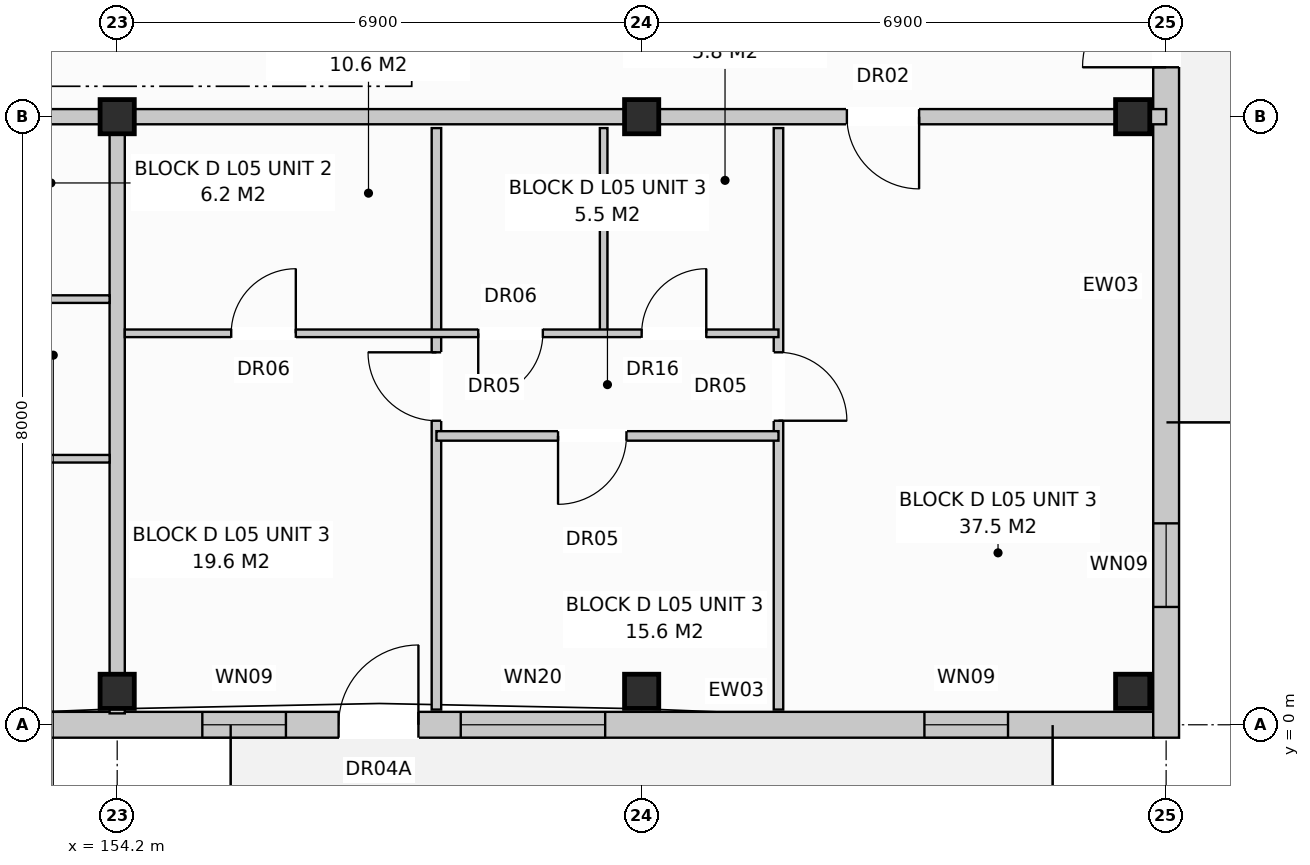
"""IFC4 building model, lengths in metres.
Left out: names, types, materials, properties, quantities, classifications, styles, units other than length and angle.
Written with IfcOpenShell. Run it as: python <this file> out.ifc"""

import sys

from ifc_helpers import new_model, si_unit, direction, frame, frame_2d, origin, origin_with_axes, origin_2d, place, context, subcontext, project, spatial, rectangle, extrude, element, fill, save


model = new_model("IFC4")
c1 = context("Model", 3, precision=1e-05, world=origin(), true_north=direction((0.0, 1.0)))
c2 = subcontext(c1, "Body", "Model", "MODEL_VIEW")
j1 = project(units=[si_unit("LENGTHUNIT", "METRE"), si_unit("PLANEANGLEUNIT", "RADIAN")], contexts=[c1])
p1 = place(None, origin())
s1 = spatial("IfcSite", under=j1, at=p1, CompositionType="ELEMENT")
p2 = place(p1, origin())
s2 = spatial("IfcBuilding", under=s1, at=p2, CompositionType="ELEMENT")
p3 = place(p2, frame((0.0, 0.0, 17.6)))
s3 = spatial("IfcBuildingStorey", under=s2, at=p3, CompositionType="ELEMENT", Elevation=17.6)
for number, where, z_axis, x_axis in (
    (1, (154.2, 0.44, 0.0), (0.0, 0.0, 1.0), (1.0, 0.0, 0.0)),
    (2, (154.2, 8.0, 0.0), (0.0, 0.0, 1.0), (1.0, 0.0, 0.0)),
    (3, (161.1, 0.44, 0.0), (0.0, 0.0, 1.0), (1.0, 0.0, 0.0)),
    (4, (161.1, 8.0, 0.0), (0.0, 0.0, 1.0), (1.0, 0.0, 0.0)),
    (5, (167.56, 0.44, 0.0), (0.0, 0.0, 1.0), (1.0, 0.0, 0.0)),
    (6, (167.56, 8.0, 0.0), (0.0, 0.0, 1.0), (1.0, 0.0, 0.0)),
):
    element("IfcColumn", number, at=place(p3, frame(where, z_axis=z_axis, x_axis=x_axis)), inside=s3, PredefinedType="COLUMN", context=c2, shape_type="SweptSolid", body=[
        extrude(rectangle(XDim=0.45, YDim=0.45, at=origin_2d()), origin(), (0.0, 0.0, 1.0), 3.2),
    ])
p4 = place(p3, frame((126.76, 0.0, 0.0), z_axis=(0.0, 0.0, 1.0), x_axis=(1.0, 0.0, 0.0)))
e7 = element("IfcWall", 7, at=p4, inside=s3, PredefinedType="STANDARD", context=c2, shape_type="SweptSolid", body=[
    extrude(rectangle(XDim=41.08, YDim=0.34, at=frame_2d((20.54, 0.0))), origin(), (0.0, 0.0, 1.0), 2.95),
])
p5 = place(p4, frame((4.853, 0.0, 0.0)))
e8 = element("IfcOpeningElement", 8, at=p5, cuts=e7, PredefinedType="OPENING", context=c2, shape_type="SweptSolid", body=[
    extrude(rectangle(XDim=1.05, YDim=2.12, at=frame_2d((0.525, 1.06))), frame((0.0, 0.182, 0.0), z_axis=(0.0, -1.0, 0.0), x_axis=(1.0, 0.0, 0.0)), (0.0, 0.0, 1.0), 0.364),
])
p6 = place(p4, frame((15.253, 0.0, 0.0)))
e9 = element("IfcOpeningElement", 9, at=p6, cuts=e7, PredefinedType="OPENING", context=c2, shape_type="SweptSolid", body=[
    extrude(rectangle(XDim=1.05, YDim=2.12, at=frame_2d((0.525, 1.06))), frame((0.0, 0.182, 0.0), z_axis=(0.0, -1.0, 0.0), x_axis=(1.0, 0.0, 0.0)), (0.0, 0.0, 1.0), 0.364),
])
p7 = place(p4, frame((30.353, 0.0, 0.0)))
e10 = element("IfcOpeningElement", 10, at=p7, cuts=e7, PredefinedType="OPENING", context=c2, shape_type="SweptSolid", body=[
    extrude(rectangle(XDim=1.05, YDim=2.12, at=frame_2d((0.525, 1.06))), frame((0.0, 0.182, 0.0), z_axis=(0.0, -1.0, 0.0), x_axis=(1.0, 0.0, 0.0)), (0.0, 0.0, 1.0), 0.364),
])
p8 = place(p4, frame((2.46, 0.0, 0.72)))
e11 = element("IfcOpeningElement", 11, at=p8, cuts=e7, PredefinedType="OPENING", context=c2, shape_type="SweptSolid", body=[
    extrude(rectangle(XDim=1.1, YDim=1.5, at=frame_2d((0.55, 0.75))), frame((0.0, 0.182, 0.0), z_axis=(0.0, -1.0, 0.0), x_axis=(1.0, 0.0, 0.0)), (0.0, 0.0, 1.0), 0.364),
])
p9 = place(p4, frame((7.76, 0.0, 0.72)))
e12 = element("IfcOpeningElement", 12, at=p9, cuts=e7, PredefinedType="OPENING", context=c2, shape_type="SweptSolid", body=[
    extrude(rectangle(XDim=1.9, YDim=1.85, at=frame_2d((0.95, 0.925))), frame((0.0, 0.182, 0.0), z_axis=(0.0, -1.0, 0.0), x_axis=(1.0, 0.0, 0.0)), (0.0, 0.0, 1.0), 0.364),
])
p10 = place(p4, frame((11.81, 0.0, 0.72)))
e13 = element("IfcOpeningElement", 13, at=p10, cuts=e7, PredefinedType="OPENING", context=c2, shape_type="SweptSolid", body=[
    extrude(rectangle(XDim=1.1, YDim=1.5, at=frame_2d((0.55, 0.75))), frame((0.0, 0.182, 0.0), z_axis=(0.0, -1.0, 0.0), x_axis=(1.0, 0.0, 0.0)), (0.0, 0.0, 1.0), 0.364),
])
p11 = place(p4, frame((17.61, 0.0, 0.8)))
e14 = element("IfcOpeningElement", 14, at=p11, cuts=e7, PredefinedType="OPENING", context=c2, shape_type="SweptSolid", body=[
    extrude(rectangle(XDim=1.8, YDim=1.7, at=frame_2d((0.9, 0.85))), frame((0.0, 0.182, 0.0), z_axis=(0.0, -1.0, 0.0), x_axis=(1.0, 0.0, 0.0)), (0.0, 0.0, 1.0), 0.364),
])
p12 = place(p4, frame((21.56, 0.0, 0.72)))
e15 = element("IfcOpeningElement", 15, at=p12, cuts=e7, PredefinedType="OPENING", context=c2, shape_type="SweptSolid", body=[
    extrude(rectangle(XDim=1.9, YDim=1.85, at=frame_2d((0.95, 0.925))), frame((0.0, 0.182, 0.0), z_axis=(0.0, -1.0, 0.0), x_axis=(1.0, 0.0, 0.0)), (0.0, 0.0, 1.0), 0.364),
])
p13 = place(p4, frame((25.36, 0.0, 0.72)))
e16 = element("IfcOpeningElement", 16, at=p13, cuts=e7, PredefinedType="OPENING", context=c2, shape_type="SweptSolid", body=[
    extrude(rectangle(XDim=1.1, YDim=1.5, at=frame_2d((0.55, 0.75))), frame((0.0, 0.182, 0.0), z_axis=(0.0, -1.0, 0.0), x_axis=(1.0, 0.0, 0.0)), (0.0, 0.0, 1.0), 0.364),
])
p14 = place(p4, frame((28.56, 0.0, 0.72)))
e17 = element("IfcOpeningElement", 17, at=p14, cuts=e7, PredefinedType="OPENING", context=c2, shape_type="SweptSolid", body=[
    extrude(rectangle(XDim=1.1, YDim=1.5, at=frame_2d((0.55, 0.75))), frame((0.0, 0.182, 0.0), z_axis=(0.0, -1.0, 0.0), x_axis=(1.0, 0.0, 0.0)), (0.0, 0.0, 1.0), 0.364),
])
p15 = place(p4, frame((31.96, 0.0, 0.72)))
e18 = element("IfcOpeningElement", 18, at=p15, cuts=e7, PredefinedType="OPENING", context=c2, shape_type="SweptSolid", body=[
    extrude(rectangle(XDim=1.9, YDim=1.85, at=frame_2d((0.95, 0.925))), frame((0.0, 0.182, 0.0), z_axis=(0.0, -1.0, 0.0), x_axis=(1.0, 0.0, 0.0)), (0.0, 0.0, 1.0), 0.364),
])
p16 = place(p4, frame((38.06, 0.0, 0.72)))
e19 = element("IfcOpeningElement", 19, at=p16, cuts=e7, PredefinedType="OPENING", context=c2, shape_type="SweptSolid", body=[
    extrude(rectangle(XDim=1.1, YDim=1.5, at=frame_2d((0.55, 0.75))), frame((0.0, 0.182, 0.0), z_axis=(0.0, -1.0, 0.0), x_axis=(1.0, 0.0, 0.0)), (0.0, 0.0, 1.0), 0.364),
])
p17 = place(p3, frame((168.0, -0.17, 0.0), z_axis=(0.0, 0.0, 1.0), x_axis=(0.0, 1.0, 0.0)))
e20 = element("IfcWall", 20, at=p17, inside=s3, PredefinedType="STANDARD", context=c2, shape_type="SweptSolid", body=[
    extrude(rectangle(XDim=18.74, YDim=0.34, at=frame_2d((9.37, 0.0))), origin(), (0.0, 0.0, 1.0), 2.95),
])
p18 = place(p17, frame((8.82, 0.0, 0.0)))
e21 = element("IfcOpeningElement", 21, at=p18, cuts=e20, PredefinedType="OPENING", context=c2, shape_type="SweptSolid", body=[
    extrude(rectangle(XDim=1.1, YDim=2.1, at=frame_2d((0.55, 1.05))), frame((0.0, 0.182, 0.0), z_axis=(0.0, -1.0, 0.0), x_axis=(1.0, 0.0, 0.0)), (0.0, 0.0, 1.0), 0.364),
])
p19 = place(p17, frame((1.72, 0.0, 0.72)))
e22 = element("IfcOpeningElement", 22, at=p19, cuts=e20, PredefinedType="OPENING", context=c2, shape_type="SweptSolid", body=[
    extrude(rectangle(XDim=1.1, YDim=1.5, at=frame_2d((0.55, 0.75))), frame((0.0, 0.182, 0.0), z_axis=(0.0, -1.0, 0.0), x_axis=(1.0, 0.0, 0.0)), (0.0, 0.0, 1.0), 0.364),
])
p20 = place(p17, frame((15.92, 0.0, 0.72)))
e23 = element("IfcOpeningElement", 23, at=p20, cuts=e20, PredefinedType="OPENING", context=c2, shape_type="SweptSolid", body=[
    extrude(rectangle(XDim=1.1, YDim=1.5, at=frame_2d((0.55, 0.75))), frame((0.0, 0.182, 0.0), z_axis=(0.0, -1.0, 0.0), x_axis=(1.0, 0.0, 0.0)), (0.0, 0.0, 1.0), 0.364),
])
p21 = place(p3, frame((154.2, 7.85, 0.0), z_axis=(0.0, 0.0, 1.0), x_axis=(0.0, -1.0, 0.0)))
e24 = element("IfcWall", 24, at=p21, inside=s3, PredefinedType="PARTITIONING", context=c2, shape_type="SweptSolid", body=[
    extrude(rectangle(XDim=7.7, YDim=0.2, at=frame_2d((3.85, 0.0))), origin(), (0.0, 0.0, 1.0), 2.95),
])
p22 = place(p3, frame((147.3, 8.0, 0.0), z_axis=(0.0, 0.0, 1.0), x_axis=(1.0, 0.0, 0.0)))
e25 = element("IfcWall", 25, at=p22, inside=s3, PredefinedType="PARTITIONING", context=c2, shape_type="SweptSolid", body=[
    extrude(rectangle(XDim=6.9, YDim=0.2, at=frame_2d((3.45, 0.0))), origin(), (0.0, 0.0, 1.0), 2.39),
])
p23 = place(p22, frame((2.0, 0.0, 0.0)))
e26 = element("IfcOpeningElement", 26, at=p23, cuts=e25, PredefinedType="OPENING", context=c2, shape_type="SweptSolid", body=[
    extrude(rectangle(XDim=0.95, YDim=2.15, at=frame_2d((0.475, 1.075))), frame((0.0, 0.112, 0.0), z_axis=(0.0, -1.0, 0.0), x_axis=(1.0, 0.0, 0.0)), (0.0, 0.0, 1.0), 0.224),
])
for number, where, z_axis, x_axis in (
    (27, (151.2, 5.6, 0.0), (0.0, 0.0, 1.0), (1.0, 0.0, 0.0)),
    (28, (151.2, 3.5, 0.0), (0.0, 0.0, 1.0), (1.0, 0.0, 0.0)),
):
    element("IfcWall", number, at=place(p3, frame(where, z_axis=z_axis, x_axis=x_axis)), inside=s3, PredefinedType="PARTITIONING", context=c2, shape_type="SweptSolid", body=[
        extrude(rectangle(XDim=2.9, YDim=0.1, at=frame_2d((1.45, 0.0))), origin(), (0.0, 0.0, 1.0), 2.95),
    ])
p24 = place(p3, frame((154.2, 8.0, 0.0), z_axis=(0.0, 0.0, 1.0), x_axis=(1.0, 0.0, 0.0)))
e29 = element("IfcWall", 29, at=p24, inside=s3, PredefinedType="PARTITIONING", context=c2, shape_type="SweptSolid", body=[
    extrude(rectangle(XDim=13.8, YDim=0.2, at=frame_2d((6.9, 0.0))), origin(), (0.0, 0.0, 1.0), 2.39),
])
p25 = place(p24, frame((9.6, 0.0, 0.0)))
e30 = element("IfcOpeningElement", 30, at=p25, cuts=e29, PredefinedType="OPENING", context=c2, shape_type="SweptSolid", body=[
    extrude(rectangle(XDim=0.95, YDim=2.15, at=frame_2d((0.475, 1.075))), frame((0.0, 0.112, 0.0), z_axis=(0.0, -1.0, 0.0), x_axis=(1.0, 0.0, 0.0)), (0.0, 0.0, 1.0), 0.224),
])
p26 = place(p3, frame((162.9, 7.85, 0.0), z_axis=(0.0, 0.0, 1.0), x_axis=(0.0, -1.0, 0.0)))
e31 = element("IfcWall", 31, at=p26, inside=s3, PredefinedType="PARTITIONING", context=c2, shape_type="SweptSolid", body=[
    extrude(rectangle(XDim=7.65, YDim=0.125, at=frame_2d((3.825, 0.0))), origin(), (0.0, 0.0, 1.0), 2.95),
])
p27 = place(p26, frame((2.95, 0.0, 0.0)))
e32 = element("IfcOpeningElement", 32, at=p27, cuts=e31, PredefinedType="OPENING", context=c2, shape_type="SweptSolid", body=[
    extrude(rectangle(XDim=0.9, YDim=2.1, at=frame_2d((0.45, 1.05))), frame((0.0, 0.074, 0.0), z_axis=(0.0, -1.0, 0.0), x_axis=(1.0, 0.0, 0.0)), (0.0, 0.0, 1.0), 0.149),
])
p28 = place(p3, frame((158.4, 7.85, 0.0), z_axis=(0.0, 0.0, 1.0), x_axis=(0.0, -1.0, 0.0)))
e33 = element("IfcWall", 33, at=p28, inside=s3, PredefinedType="PARTITIONING", context=c2, shape_type="SweptSolid", body=[
    extrude(rectangle(XDim=7.65, YDim=0.125, at=frame_2d((3.825, 0.0))), origin(), (0.0, 0.0, 1.0), 2.95),
])
p29 = place(p28, frame((2.95, 0.0, 0.0)))
e34 = element("IfcOpeningElement", 34, at=p29, cuts=e33, PredefinedType="OPENING", context=c2, shape_type="SweptSolid", body=[
    extrude(rectangle(XDim=0.9, YDim=2.1, at=frame_2d((0.45, 1.05))), frame((0.0, 0.074, 0.0), z_axis=(0.0, -1.0, 0.0), x_axis=(1.0, 0.0, 0.0)), (0.0, 0.0, 1.0), 0.149),
])
p30 = place(p3, frame((160.6, 7.85, 0.0), z_axis=(0.0, 0.0, 1.0), x_axis=(0.0, -1.0, 0.0)))
e35 = element("IfcWall", 35, at=p30, inside=s3, PredefinedType="PARTITIONING", context=c2, shape_type="SweptSolid", body=[
    extrude(rectangle(XDim=2.7, YDim=0.1, at=frame_2d((1.35, 0.0))), origin(), (0.0, 0.0, 1.0), 2.95),
])
p31 = place(p3, frame((154.3, 5.15, 0.0), z_axis=(0.0, 0.0, 1.0), x_axis=(1.0, 0.0, 0.0)))
e36 = element("IfcWall", 36, at=p31, inside=s3, PredefinedType="PARTITIONING", context=c2, shape_type="SweptSolid", body=[
    extrude(rectangle(XDim=8.6, YDim=0.1, at=frame_2d((4.3, 0.0))), origin(), (0.0, 0.0, 1.0), 2.95),
])
p32 = place(p31, frame((1.4, 0.0, 0.0)))
e37 = element("IfcOpeningElement", 37, at=p32, cuts=e36, PredefinedType="OPENING", context=c2, shape_type="SweptSolid", body=[
    extrude(rectangle(XDim=0.85, YDim=2.05, at=frame_2d((0.425, 1.025))), frame((0.0, 0.062, 0.0), z_axis=(0.0, -1.0, 0.0), x_axis=(1.0, 0.0, 0.0)), (0.0, 0.0, 1.0), 0.124),
])
p33 = place(p31, frame((4.65, 0.0, 0.0)))
e38 = element("IfcOpeningElement", 38, at=p33, cuts=e36, PredefinedType="OPENING", context=c2, shape_type="SweptSolid", body=[
    extrude(rectangle(XDim=0.85, YDim=2.05, at=frame_2d((0.425, 1.025))), frame((0.0, 0.062, 0.0), z_axis=(0.0, -1.0, 0.0), x_axis=(1.0, 0.0, 0.0)), (0.0, 0.0, 1.0), 0.124),
])
p34 = place(p31, frame((6.8, 0.0, 0.0)))
e39 = element("IfcOpeningElement", 39, at=p34, cuts=e36, PredefinedType="OPENING", context=c2, shape_type="SweptSolid", body=[
    extrude(rectangle(XDim=0.85, YDim=2.1, at=frame_2d((0.425, 1.05))), frame((0.0, 0.062, 0.0), z_axis=(0.0, -1.0, 0.0), x_axis=(1.0, 0.0, 0.0)), (0.0, 0.0, 1.0), 0.124),
])
p35 = place(p3, frame((158.4, 3.8, 0.0), z_axis=(0.0, 0.0, 1.0), x_axis=(1.0, 0.0, 0.0)))
e40 = element("IfcWall", 40, at=p35, inside=s3, PredefinedType="PARTITIONING", context=c2, shape_type="SweptSolid", body=[
    extrude(rectangle(XDim=4.5, YDim=0.125, at=frame_2d((2.25, 0.0))), origin(), (0.0, 0.0, 1.0), 2.95),
])
p36 = place(p35, frame((1.6, 0.0, 0.0)))
e41 = element("IfcOpeningElement", 41, at=p36, cuts=e40, PredefinedType="OPENING", context=c2, shape_type="SweptSolid", body=[
    extrude(rectangle(XDim=0.9, YDim=2.1, at=frame_2d((0.45, 1.05))), frame((0.0, 0.074, 0.0), z_axis=(0.0, -1.0, 0.0), x_axis=(1.0, 0.0, 0.0)), (0.0, 0.0, 1.0), 0.149),
])
p37 = place(p7, origin_with_axes())
e42 = element("IfcDoor", 42, at=p37, inside=s3, OperationType="SINGLE_SWING_RIGHT", PredefinedType="DOOR", context=c2, shape_type="SweptSolid", body=[
    extrude(rectangle(XDim=1.05, YDim=2.12, at=frame_2d((0.525, 1.06))), frame((0.0, 0.025, 0.0), z_axis=(0.0, -1.0, 0.0), x_axis=(1.0, 0.0, 0.0)), (0.0, 0.0, 1.0), 0.05),
])
fill(e10, e42)
p38 = place(p14, origin_with_axes())
e43 = element("IfcWindow", 43, at=p38, inside=s3, PartitioningType="SINGLE_PANEL", PredefinedType="WINDOW", context=c2, shape_type="SweptSolid", body=[
    extrude(rectangle(XDim=1.1, YDim=1.5, at=frame_2d((0.55, 0.75))), frame((0.0, 0.03, 0.0), z_axis=(0.0, -1.0, 0.0), x_axis=(1.0, 0.0, 0.0)), (0.0, 0.0, 1.0), 0.06),
])
fill(e17, e43)
p39 = place(p15, origin_with_axes())
e44 = element("IfcWindow", 44, at=p39, inside=s3, PartitioningType="SINGLE_PANEL", PredefinedType="WINDOW", context=c2, shape_type="SweptSolid", body=[
    extrude(rectangle(XDim=1.9, YDim=1.85, at=frame_2d((0.95, 0.925))), frame((0.0, 0.03, 0.0), z_axis=(0.0, -1.0, 0.0), x_axis=(1.0, 0.0, 0.0)), (0.0, 0.0, 1.0), 0.06),
])
fill(e18, e44)
p40 = place(p16, origin_with_axes())
e45 = element("IfcWindow", 45, at=p40, inside=s3, PartitioningType="SINGLE_PANEL", PredefinedType="WINDOW", context=c2, shape_type="SweptSolid", body=[
    extrude(rectangle(XDim=1.1, YDim=1.5, at=frame_2d((0.55, 0.75))), frame((0.0, 0.03, 0.0), z_axis=(0.0, -1.0, 0.0), x_axis=(1.0, 0.0, 0.0)), (0.0, 0.0, 1.0), 0.06),
])
fill(e19, e45)
p41 = place(p18, origin_with_axes())
e46 = element("IfcDoor", 46, at=p41, inside=s3, OperationType="SINGLE_SWING_LEFT", PredefinedType="DOOR", context=c2, shape_type="SweptSolid", body=[
    extrude(rectangle(XDim=1.1, YDim=2.1, at=frame_2d((0.55, 1.05))), frame((0.0, 0.025, 0.0), z_axis=(0.0, -1.0, 0.0), x_axis=(1.0, 0.0, 0.0)), (0.0, 0.0, 1.0), 0.05),
])
fill(e21, e46)
p42 = place(p19, origin_with_axes())
e47 = element("IfcWindow", 47, at=p42, inside=s3, PartitioningType="SINGLE_PANEL", PredefinedType="WINDOW", context=c2, shape_type="SweptSolid", body=[
    extrude(rectangle(XDim=1.1, YDim=1.5, at=frame_2d((0.55, 0.75))), frame((0.0, 0.03, 0.0), z_axis=(0.0, -1.0, 0.0), x_axis=(1.0, 0.0, 0.0)), (0.0, 0.0, 1.0), 0.06),
])
fill(e22, e47)
p43 = place(p25, frame((0.95, 0.0, 0.0), z_axis=(0.0, 0.0, 1.0), x_axis=(-1.0, 0.0, 0.0)))
e48 = element("IfcDoor", 48, at=p43, inside=s3, OperationType="SINGLE_SWING_RIGHT", PredefinedType="DOOR", context=c2, shape_type="SweptSolid", body=[
    extrude(rectangle(XDim=0.95, YDim=2.15, at=frame_2d((0.475, 1.075))), frame((0.0, 0.025, 0.0), z_axis=(0.0, -1.0, 0.0), x_axis=(1.0, 0.0, 0.0)), (0.0, 0.0, 1.0), 0.05),
])
fill(e30, e48)
p44 = place(p27, origin_with_axes())
e49 = element("IfcDoor", 49, at=p44, inside=s3, OperationType="SINGLE_SWING_RIGHT", PredefinedType="DOOR", context=c2, shape_type="SweptSolid", body=[
    extrude(rectangle(XDim=0.9, YDim=2.1, at=frame_2d((0.45, 1.05))), frame((0.0, 0.025, 0.0), z_axis=(0.0, -1.0, 0.0), x_axis=(1.0, 0.0, 0.0)), (0.0, 0.0, 1.0), 0.05),
])
fill(e32, e49)
p45 = place(p29, frame((0.9, 0.0, 0.0), z_axis=(0.0, 0.0, 1.0), x_axis=(-1.0, 0.0, 0.0)))
e50 = element("IfcDoor", 50, at=p45, inside=s3, OperationType="SINGLE_SWING_LEFT", PredefinedType="DOOR", context=c2, shape_type="SweptSolid", body=[
    extrude(rectangle(XDim=0.9, YDim=2.1, at=frame_2d((0.45, 1.05))), frame((0.0, 0.025, 0.0), z_axis=(0.0, -1.0, 0.0), x_axis=(1.0, 0.0, 0.0)), (0.0, 0.0, 1.0), 0.05),
])
fill(e34, e50)
p46 = place(p32, origin_with_axes())
e51 = element("IfcDoor", 51, at=p46, inside=s3, OperationType="SINGLE_SWING_RIGHT", PredefinedType="DOOR", context=c2, shape_type="SweptSolid", body=[
    extrude(rectangle(XDim=0.85, YDim=2.05, at=frame_2d((0.425, 1.025))), frame((0.0, 0.025, 0.0), z_axis=(0.0, -1.0, 0.0), x_axis=(1.0, 0.0, 0.0)), (0.0, 0.0, 1.0), 0.05),
])
fill(e37, e51)
p47 = place(p33, frame((0.85, 0.0, 0.0), z_axis=(0.0, 0.0, 1.0), x_axis=(-1.0, 0.0, 0.0)))
e52 = element("IfcDoor", 52, at=p47, inside=s3, OperationType="SINGLE_SWING_LEFT", PredefinedType="DOOR", context=c2, shape_type="SweptSolid", body=[
    extrude(rectangle(XDim=0.85, YDim=2.05, at=frame_2d((0.425, 1.025))), frame((0.0, 0.025, 0.0), z_axis=(0.0, -1.0, 0.0), x_axis=(1.0, 0.0, 0.0)), (0.0, 0.0, 1.0), 0.05),
])
fill(e38, e52)
p48 = place(p34, origin_with_axes())
e53 = element("IfcDoor", 53, at=p48, inside=s3, OperationType="SINGLE_SWING_RIGHT", PredefinedType="DOOR", context=c2, shape_type="SweptSolid", body=[
    extrude(rectangle(XDim=0.85, YDim=2.1, at=frame_2d((0.425, 1.05))), frame((0.0, 0.025, 0.0), z_axis=(0.0, -1.0, 0.0), x_axis=(1.0, 0.0, 0.0)), (0.0, 0.0, 1.0), 0.05),
])
fill(e39, e53)
p49 = place(p36, frame((0.9, 0.0, 0.0), z_axis=(0.0, 0.0, 1.0), x_axis=(-1.0, 0.0, 0.0)))
e54 = element("IfcDoor", 54, at=p49, inside=s3, OperationType="SINGLE_SWING_LEFT", PredefinedType="DOOR", context=c2, shape_type="SweptSolid", body=[
    extrude(rectangle(XDim=0.9, YDim=2.1, at=frame_2d((0.45, 1.05))), frame((0.0, 0.025, 0.0), z_axis=(0.0, -1.0, 0.0), x_axis=(1.0, 0.0, 0.0)), (0.0, 0.0, 1.0), 0.05),
])
fill(e41, e54)
save(model, sys.argv[1])
